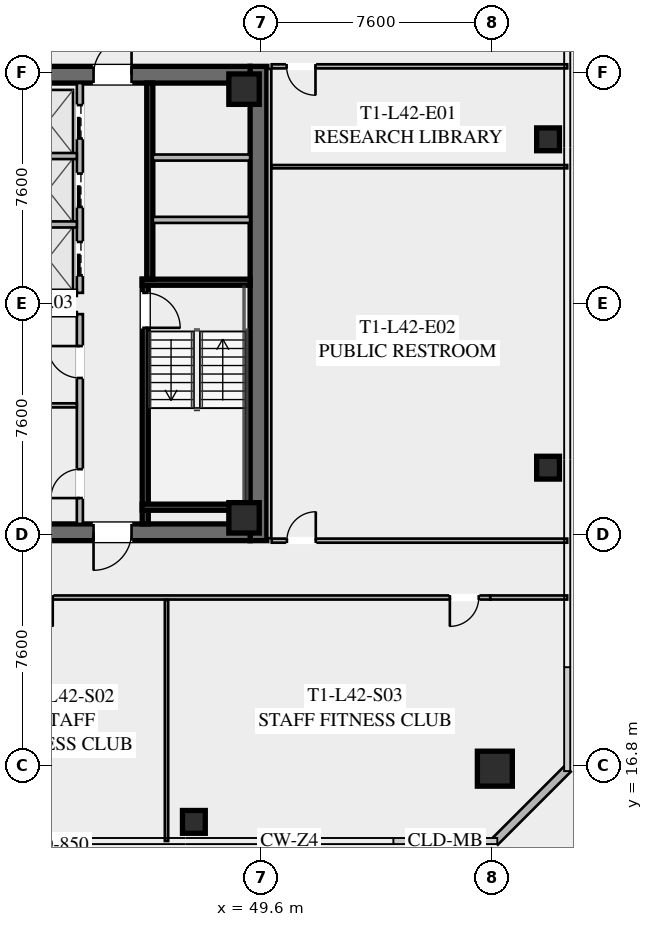
"""IFC4 building model, lengths in metres.
Left out: names, types, materials, properties, quantities, classifications, styles, units other than length and angle.
Written with IfcOpenShell. Run it as: python <this file> out.ifc"""

import sys

from ifc_helpers import new_model, si_unit, direction, frame, frame_2d, origin, origin_2d, place, context, subcontext, project, spatial, rectangle, hollow_rectangle, extrude, element, fill, save


model = new_model("IFC4")
c1 = context("Model", 3, precision=1e-05, world=origin(), true_north=direction((0.0, 1.0)))
c2 = subcontext(c1, "Body", "Model", "MODEL_VIEW")
j1 = project(units=[si_unit("LENGTHUNIT", "METRE"), si_unit("PLANEANGLEUNIT", "RADIAN")], contexts=[c1])
p1 = place(None, origin())
s1 = spatial("IfcSite", under=j1, at=p1, CompositionType="ELEMENT")
p2 = place(p1, origin())
s2 = spatial("IfcBuilding", under=s1, at=p2, CompositionType="ELEMENT")
p3 = place(p2, frame((0.0, 0.0, 157.0)))
s3 = spatial("IfcBuildingStorey", under=s2, at=p3, CompositionType="ELEMENT", Elevation=157.0)
p4 = place(p3, frame((49.525, 39.8, 0.0), z_axis=(0.0, 0.0, 1.0), x_axis=(0.0, -1.0, 0.0)))
e1 = element("IfcWall", 1, at=p4, inside=s3, PredefinedType="SHEAR", context=c2, shape_type="SweptSolid", body=[
    extrude(rectangle(XDim=15.6, YDim=0.55, at=frame_2d((7.8, 0.0))), origin(), (0.0, 0.0, 1.0), 3.55),
])
p5 = place(p3, frame((49.25, 24.475, 0.0), z_axis=(0.0, 0.0, 1.0), x_axis=(-1.0, 0.0, 0.0)))
e2 = element("IfcWall", 2, at=p5, inside=s3, PredefinedType="SHEAR", context=c2, shape_type="SweptSolid", body=[
    extrude(rectangle(XDim=14.5, YDim=0.55, at=frame_2d((7.25, 0.0))), origin(), (0.0, 0.0, 1.0), 3.55),
])
p6 = place(p5, frame((8.95, 0.0, 0.0)))
e3 = element("IfcOpeningElement", 3, at=p6, cuts=e2, PredefinedType="OPENING", context=c2, shape_type="SweptSolid", body=[
    extrude(rectangle(XDim=1.25, YDim=2.25, at=frame_2d((0.625, 1.125))), frame((0.0, 0.285, 0.0), z_axis=(0.0, -1.0, 0.0), x_axis=(1.0, 0.0, 0.0)), (0.0, 0.0, 1.0), 0.57),
])
p7 = place(p5, frame((3.9, 0.0, 0.0)))
e4 = element("IfcOpeningElement", 4, at=p7, cuts=e2, PredefinedType="OPENING", context=c2, shape_type="SweptSolid", body=[
    extrude(rectangle(XDim=1.25, YDim=2.25, at=frame_2d((0.625, 1.125))), frame((0.0, 0.285, 0.0), z_axis=(0.0, -1.0, 0.0), x_axis=(1.0, 0.0, 0.0)), (0.0, 0.0, 1.0), 0.57),
])
p8 = place(p3, frame((34.75, 39.525, 0.0), z_axis=(0.0, 0.0, 1.0), x_axis=(1.0, 0.0, 0.0)))
e5 = element("IfcWall", 5, at=p8, inside=s3, PredefinedType="SHEAR", context=c2, shape_type="SweptSolid", body=[
    extrude(rectangle(XDim=14.5, YDim=0.55, at=frame_2d((7.25, 0.0))), origin(), (0.0, 0.0, 1.0), 3.55),
])
p9 = place(p8, frame((4.3, 0.0, 0.0)))
e6 = element("IfcOpeningElement", 6, at=p9, cuts=e5, PredefinedType="OPENING", context=c2, shape_type="SweptSolid", body=[
    extrude(rectangle(XDim=1.25, YDim=2.25, at=frame_2d((0.625, 1.125))), frame((0.0, 0.285, 0.0), z_axis=(0.0, -1.0, 0.0), x_axis=(1.0, 0.0, 0.0)), (0.0, 0.0, 1.0), 0.57),
])
p10 = place(p8, frame((9.35, 0.0, 0.0)))
e7 = element("IfcOpeningElement", 7, at=p10, cuts=e5, PredefinedType="OPENING", context=c2, shape_type="SweptSolid", body=[
    extrude(rectangle(XDim=1.25, YDim=2.25, at=frame_2d((0.625, 1.125))), frame((0.0, 0.285, 0.0), z_axis=(0.0, -1.0, 0.0), x_axis=(1.0, 0.0, 0.0)), (0.0, 0.0, 1.0), 0.57),
])
for number, where, z_axis, x_axis in (
    (8, (49.05, 24.95, 0.0), (0.0, 0.0, 1.0), (1.0, 0.0, 0.0)),
    (9, (49.05, 39.05, 0.0), (0.0, 0.0, 1.0), (1.0, 0.0, 0.0)),
):
    element("IfcColumn", number, at=place(p3, frame(where, z_axis=z_axis, x_axis=x_axis)), inside=s3, PredefinedType="COLUMN", context=c2, shape_type="SweptSolid", body=[
        extrude(hollow_rectangle(XDim=1.0, YDim=1.0, WallThickness=0.04, at=origin_2d()), origin(), (0.0, 0.0, 1.0), 3.37),
    ])
p11 = place(p3, frame((57.3, 16.7, -0.175), z_axis=(0.0, 0.0, 1.0), x_axis=(1.0, 0.0, 0.0)))
e10 = element("IfcColumn", 10, at=p11, inside=s3, PredefinedType="COLUMN", context=c2, shape_type="SweptSolid", body=[
    extrude(hollow_rectangle(XDim=1.15, YDim=1.15, WallThickness=0.045, at=origin_2d()), origin(), (0.0, 0.0, 1.0), 3.545),
])
for number, where, z_axis, x_axis in (
    (11, (47.4, 14.95, -0.175), (0.0, 0.0, 1.0), (1.0, 0.0, 0.0)),
    (12, (59.05, 26.6, -0.175), (0.0, 0.0, 1.0), (1.0, 0.0, 0.0)),
    (13, (59.05, 37.4, -0.175), (0.0, 0.0, 1.0), (1.0, 0.0, 0.0)),
):
    element("IfcColumn", number, at=place(p3, frame(where, z_axis=z_axis, x_axis=x_axis)), inside=s3, PredefinedType="COLUMN", context=c2, shape_type="SweptSolid", body=[
        extrude(hollow_rectangle(XDim=0.75, YDim=0.75, WallThickness=0.032, at=origin_2d()), origin(), (0.0, 0.0, 1.0), 3.545),
    ])
p12 = place(p3, frame((59.7, 16.7, 0.0), z_axis=(0.0, 0.0, 1.0), x_axis=(-0.707106781187, -0.707106781187, 0.0)))
e14 = element("IfcWall", 14, at=p12, inside=s3, PredefinedType="SOLIDWALL", context=c2, shape_type="SweptSolid", body=[
    extrude(rectangle(XDim=3.394, YDim=0.28, at=frame_2d((1.697, 0.0))), origin(), (0.0, 0.0, 1.0), 3.37),
])
p13 = place(p3, frame((45.8, 32.8, 0.0), z_axis=(0.0, 0.0, 1.0), x_axis=(0.0, -1.0, 0.0)))
e15 = element("IfcWall", 15, at=p13, inside=s3, PredefinedType="SHEAR", context=c2, shape_type="SweptSolid", body=[
    extrude(rectangle(XDim=8.05, YDim=0.2, at=frame_2d((4.025, 0.0))), origin(), (0.0, 0.0, 1.0), 3.37),
])
p14 = place(p13, frame((0.45, 0.0, 0.0)))
e16 = element("IfcOpeningElement", 16, at=p14, cuts=e15, PredefinedType="OPENING", context=c2, shape_type="SweptSolid", body=[
    extrude(rectangle(XDim=1.15, YDim=2.2, at=frame_2d((0.575, 1.1))), frame((0.0, 0.11, 0.0), z_axis=(0.0, -1.0, 0.0), x_axis=(1.0, 0.0, 0.0)), (0.0, 0.0, 1.0), 0.22),
])
for number, where, z_axis, x_axis in (
    (17, (45.7, 32.7, 0.0), (0.0, 0.0, 1.0), (1.0, 0.0, 0.0)),
    (18, (45.7, 25.3, 0.0), (0.0, 0.0, 1.0), (1.0, 0.0, 0.0)),
):
    element("IfcWall", number, at=place(p3, frame(where, z_axis=z_axis, x_axis=x_axis)), inside=s3, PredefinedType="SHEAR", context=c2, shape_type="SweptSolid", body=[
        extrude(rectangle(XDim=3.55, YDim=0.2, at=frame_2d((1.775, 0.0))), origin(), (0.0, 0.0, 1.0), 3.37),
    ])
p15 = place(p3, frame((45.95, 39.25, 0.0), z_axis=(0.0, 0.0, 1.0), x_axis=(0.0, -1.0, 0.0)))
e19 = element("IfcWall", 19, at=p15, inside=s3, PredefinedType="SHEAR", context=c2, shape_type="SweptSolid", body=[
    extrude(rectangle(XDim=6.45, YDim=0.2, at=frame_2d((3.225, 0.0))), origin(), (0.0, 0.0, 1.0), 3.37),
])
for number, where, z_axis, x_axis in (
    (20, (46.05, 34.75, 0.0), (0.0, 0.0, 1.0), (1.0, 0.0, 0.0)),
    (21, (46.05, 36.8, 0.0), (0.0, 0.0, 1.0), (1.0, 0.0, 0.0)),
):
    element("IfcWall", number, at=place(p3, frame(where, z_axis=z_axis, x_axis=x_axis)), inside=s3, PredefinedType="SOLIDWALL", context=c2, shape_type="SweptSolid", body=[
        extrude(rectangle(XDim=3.2, YDim=0.2, at=frame_2d((1.6, 0.0))), origin(), (0.0, 0.0, 1.0), 3.37),
    ])
p16 = place(p3, frame((43.65, 24.75, 0.0), z_axis=(0.0, 0.0, 1.0), x_axis=(0.0, 1.0, 0.0)))
e22 = element("IfcWall", 22, at=p16, inside=s3, PredefinedType="SOLIDWALL", context=c2, shape_type="SweptSolid", body=[
    extrude(rectangle(XDim=6.9, YDim=0.2, at=frame_2d((3.45, 0.0))), origin(), (0.0, 0.0, 1.0), 2.723),
])
p17 = place(p16, frame((0.85, 0.0, 0.0)))
e23 = element("IfcOpeningElement", 23, at=p17, cuts=e22, PredefinedType="OPENING", context=c2, shape_type="SweptSolid", body=[
    extrude(rectangle(XDim=0.95, YDim=2.05, at=frame_2d((0.475, 1.025))), frame((0.0, 0.11, 0.0), z_axis=(0.0, -1.0, 0.0), x_axis=(1.0, 0.0, 0.0)), (0.0, 0.0, 1.0), 0.22),
])
p18 = place(p16, frame((4.8, 0.0, 0.0)))
e24 = element("IfcOpeningElement", 24, at=p18, cuts=e22, PredefinedType="OPENING", context=c2, shape_type="SweptSolid", body=[
    extrude(rectangle(XDim=1.05, YDim=2.2, at=frame_2d((0.525, 1.1))), frame((0.0, 0.11, 0.0), z_axis=(0.0, -1.0, 0.0), x_axis=(1.0, 0.0, 0.0)), (0.0, 0.0, 1.0), 0.22),
])
for number, where, z_axis, x_axis in (
    (25, (41.67, 31.65, 0.0), (0.0, 0.0, 1.0), (1.0, 0.0, 0.0)),
    (26, (41.67, 28.65, 0.0), (0.0, 0.0, 1.0), (1.0, 0.0, 0.0)),
):
    element("IfcWall", number, at=place(p3, frame(where, z_axis=z_axis, x_axis=x_axis)), inside=s3, PredefinedType="PARTITIONING", context=c2, shape_type="SweptSolid", body=[
        extrude(rectangle(XDim=1.88, YDim=0.135, at=frame_2d((0.94, 0.0))), origin(), (0.0, 0.0, 1.0), 2.723),
    ])
p19 = place(p3, frame((43.65, 32.35, 0.0), z_axis=(0.0, 0.0, 1.0), x_axis=(0.0, 1.0, 0.0)))
e27 = element("IfcWall", 27, at=p19, inside=s3, PredefinedType="SOLIDWALL", context=c2, shape_type="SweptSolid", body=[
    extrude(rectangle(XDim=6.9, YDim=0.2, at=frame_2d((3.45, 0.0))), origin(), (0.0, 0.0, 1.0), 3.37),
])
p20 = place(p19, frame((0.575, 0.0, 0.0)))
e28 = element("IfcOpeningElement", 28, at=p20, cuts=e27, PredefinedType="OPENING", context=c2, shape_type="SweptSolid", body=[
    extrude(rectangle(XDim=1.1, YDim=2.2, at=frame_2d((0.55, 1.1))), frame((0.0, 0.11, 0.0), z_axis=(0.0, -1.0, 0.0), x_axis=(1.0, 0.0, 0.0)), (0.0, 0.0, 1.0), 0.22),
])
p21 = place(p19, frame((2.825, 0.0, 0.0)))
e29 = element("IfcOpeningElement", 29, at=p21, cuts=e27, PredefinedType="OPENING", context=c2, shape_type="SweptSolid", body=[
    extrude(rectangle(XDim=1.1, YDim=2.2, at=frame_2d((0.55, 1.1))), frame((0.0, 0.11, 0.0), z_axis=(0.0, -1.0, 0.0), x_axis=(1.0, 0.0, 0.0)), (0.0, 0.0, 1.0), 0.22),
])
p22 = place(p19, frame((5.075, 0.0, 0.0)))
e30 = element("IfcOpeningElement", 30, at=p22, cuts=e27, PredefinedType="OPENING", context=c2, shape_type="SweptSolid", body=[
    extrude(rectangle(XDim=1.1, YDim=2.2, at=frame_2d((0.55, 1.1))), frame((0.0, 0.11, 0.0), z_axis=(0.0, -1.0, 0.0), x_axis=(1.0, 0.0, 0.0)), (0.0, 0.0, 1.0), 0.22),
])
for number, where, z_axis, x_axis in (
    (31, (41.67, 32.35, 0.0), (0.0, 0.0, 1.0), (1.0, 0.0, 0.0)),
    (32, (41.67, 34.6, 0.0), (0.0, 0.0, 1.0), (1.0, 0.0, 0.0)),
    (33, (41.67, 36.85, 0.0), (0.0, 0.0, 1.0), (1.0, 0.0, 0.0)),
):
    element("IfcWall", number, at=place(p3, frame(where, z_axis=z_axis, x_axis=x_axis)), inside=s3, PredefinedType="SOLIDWALL", context=c2, shape_type="SweptSolid", body=[
        extrude(rectangle(XDim=1.88, YDim=0.2, at=frame_2d((0.94, 0.0))), origin(), (0.0, 0.0, 1.0), 3.37),
    ])
p23 = place(p3, frame((57.15, 22.33, 0.0), z_axis=(0.0, 0.0, 1.0), x_axis=(-1.0, 0.0, 0.0)))
e34 = element("IfcWall", 34, at=p23, inside=s3, PredefinedType="PARTITIONING", context=c2, shape_type="SweptSolid", body=[
    extrude(rectangle(XDim=30.3, YDim=0.135, at=frame_2d((15.15, 0.0))), origin(), (0.0, 0.0, 1.0), 2.723),
])
p24 = place(p23, frame((28.97, 0.0, 0.0)))
e35 = element("IfcOpeningElement", 35, at=p24, cuts=e34, PredefinedType="OPENING", context=c2, shape_type="SweptSolid", body=[
    extrude(rectangle(XDim=0.95, YDim=2.05, at=frame_2d((0.475, 1.025))), frame((0.0, 0.077, 0.0), z_axis=(0.0, -1.0, 0.0), x_axis=(1.0, 0.0, 0.0)), (0.0, 0.0, 1.0), 0.155),
])
p25 = place(p23, frame((14.392, 0.0, 0.0)))
e36 = element("IfcOpeningElement", 36, at=p25, cuts=e34, PredefinedType="OPENING", context=c2, shape_type="SweptSolid", body=[
    extrude(rectangle(XDim=0.95, YDim=2.05, at=frame_2d((0.475, 1.025))), frame((0.0, 0.077, 0.0), z_axis=(0.0, -1.0, 0.0), x_axis=(1.0, 0.0, 0.0)), (0.0, 0.0, 1.0), 0.155),
])
p26 = place(p23, frame((0.38, 0.0, 0.0)))
e37 = element("IfcOpeningElement", 37, at=p26, cuts=e34, PredefinedType="OPENING", context=c2, shape_type="SweptSolid", body=[
    extrude(rectangle(XDim=0.95, YDim=2.05, at=frame_2d((0.475, 1.025))), frame((0.0, 0.077, 0.0), z_axis=(0.0, -1.0, 0.0), x_axis=(1.0, 0.0, 0.0)), (0.0, 0.0, 1.0), 0.155),
])
p27 = place(p3, frame((57.15, 22.33, 0.0), z_axis=(0.0, 0.0, 1.0), x_axis=(1.0, 0.0, 0.0)))
e38 = element("IfcWall", 38, at=p27, inside=s3, PredefinedType="PARTITIONING", context=c2, shape_type="SweptSolid", body=[
    extrude(rectangle(XDim=2.53, YDim=0.135, at=frame_2d((1.265, 0.0))), origin(), (0.0, 0.0, 1.0), 2.723),
])
p28 = place(p3, frame((46.5, 14.32, 0.0), z_axis=(0.0, 0.0, 1.0), x_axis=(0.0, 1.0, 0.0)))
e39 = element("IfcWall", 39, at=p28, inside=s3, PredefinedType="PARTITIONING", context=c2, shape_type="SweptSolid", body=[
    extrude(rectangle(XDim=7.93, YDim=0.11, at=frame_2d((3.965, 0.0))), origin(), (0.0, 0.0, 1.0), 2.723),
])
p29 = place(p3, frame((49.88, 39.72, 0.0), z_axis=(0.0, 0.0, 1.0), x_axis=(0.0, -1.0, 0.0)))
e40 = element("IfcWall", 40, at=p29, inside=s3, PredefinedType="PARTITIONING", context=c2, shape_type="SweptSolid", body=[
    extrude(rectangle(XDim=15.44, YDim=0.135, at=frame_2d((7.72, 0.0))), origin(), (0.0, 0.0, 1.0), 2.723),
])
p30 = place(p3, frame((59.68, 39.8, 0.0), z_axis=(0.0, 0.0, 1.0), x_axis=(-1.0, 0.0, 0.0)))
e41 = element("IfcWall", 41, at=p30, inside=s3, PredefinedType="PARTITIONING", context=c2, shape_type="SweptSolid", body=[
    extrude(rectangle(XDim=9.72, YDim=0.135, at=frame_2d((4.86, 0.0))), origin(), (0.0, 0.0, 1.0), 2.723),
])
p31 = place(p30, frame((8.28, 0.0, 0.0)))
e42 = element("IfcOpeningElement", 42, at=p31, cuts=e41, PredefinedType="OPENING", context=c2, shape_type="SweptSolid", body=[
    extrude(rectangle(XDim=0.95, YDim=2.05, at=frame_2d((0.475, 1.025))), frame((0.0, 0.077, 0.0), z_axis=(0.0, -1.0, 0.0), x_axis=(1.0, 0.0, 0.0)), (0.0, 0.0, 1.0), 0.155),
])
p32 = place(p3, frame((49.96, 24.2, 0.0), z_axis=(0.0, 0.0, 1.0), x_axis=(1.0, 0.0, 0.0)))
e43 = element("IfcWall", 43, at=p32, inside=s3, PredefinedType="PARTITIONING", context=c2, shape_type="SweptSolid", body=[
    extrude(rectangle(XDim=9.72, YDim=0.135, at=frame_2d((4.86, 0.0))), origin(), (0.0, 0.0, 1.0), 2.723),
])
p33 = place(p32, frame((0.5, 0.0, 0.0)))
e44 = element("IfcOpeningElement", 44, at=p33, cuts=e43, PredefinedType="OPENING", context=c2, shape_type="SweptSolid", body=[
    extrude(rectangle(XDim=0.95, YDim=2.05, at=frame_2d((0.475, 1.025))), frame((0.0, 0.077, 0.0), z_axis=(0.0, -1.0, 0.0), x_axis=(1.0, 0.0, 0.0)), (0.0, 0.0, 1.0), 0.155),
])
p34 = place(p3, frame((49.96, 36.5, 0.0), z_axis=(0.0, 0.0, 1.0), x_axis=(1.0, 0.0, 0.0)))
e45 = element("IfcWall", 45, at=p34, inside=s3, PredefinedType="PARTITIONING", context=c2, shape_type="SweptSolid", body=[
    extrude(rectangle(XDim=9.72, YDim=0.11, at=frame_2d((4.86, 0.0))), origin(), (0.0, 0.0, 1.0), 2.723),
])
p35 = place(p10, origin())
e46 = element("IfcDoor", 46, at=p35, inside=s3, OperationType="SINGLE_SWING_RIGHT", PredefinedType="DOOR", context=c2, shape_type="SweptSolid", body=[
    extrude(rectangle(XDim=1.25, YDim=2.25, at=frame_2d((0.625, 1.125))), frame((0.0, 0.025, 0.0), z_axis=(0.0, -1.0, 0.0), x_axis=(1.0, 0.0, 0.0)), (0.0, 0.0, 1.0), 0.05),
])
fill(e7, e46)
p36 = place(p7, origin())
e47 = element("IfcDoor", 47, at=p36, inside=s3, OperationType="SINGLE_SWING_RIGHT", PredefinedType="DOOR", context=c2, shape_type="SweptSolid", body=[
    extrude(rectangle(XDim=1.25, YDim=2.25, at=frame_2d((0.625, 1.125))), frame((0.0, 0.025, 0.0), z_axis=(0.0, -1.0, 0.0), x_axis=(1.0, 0.0, 0.0)), (0.0, 0.0, 1.0), 0.05),
])
fill(e4, e47)
p37 = place(p14, origin())
e48 = element("IfcDoor", 48, at=p37, inside=s3, OperationType="SINGLE_SWING_RIGHT", PredefinedType="DOOR", context=c2, shape_type="SweptSolid", body=[
    extrude(rectangle(XDim=1.15, YDim=2.2, at=frame_2d((0.575, 1.1))), frame((0.0, 0.025, 0.0), z_axis=(0.0, -1.0, 0.0), x_axis=(1.0, 0.0, 0.0)), (0.0, 0.0, 1.0), 0.05),
])
fill(e16, e48)
p38 = place(p17, origin())
e49 = element("IfcDoor", 49, at=p38, inside=s3, OperationType="SINGLE_SWING_LEFT", PredefinedType="DOOR", context=c2, shape_type="SweptSolid", body=[
    extrude(rectangle(XDim=0.95, YDim=2.05, at=frame_2d((0.475, 1.025))), frame((0.0, 0.025, 0.0), z_axis=(0.0, -1.0, 0.0), x_axis=(1.0, 0.0, 0.0)), (0.0, 0.0, 1.0), 0.05),
])
fill(e23, e49)
p39 = place(p18, origin())
e50 = element("IfcDoor", 50, at=p39, inside=s3, OperationType="SINGLE_SWING_RIGHT", PredefinedType="DOOR", context=c2, shape_type="SweptSolid", body=[
    extrude(rectangle(XDim=1.05, YDim=2.2, at=frame_2d((0.525, 1.1))), frame((0.0, 0.025, 0.0), z_axis=(0.0, -1.0, 0.0), x_axis=(1.0, 0.0, 0.0)), (0.0, 0.0, 1.0), 0.05),
])
fill(e24, e50)
p40 = place(p25, origin())
e51 = element("IfcDoor", 51, at=p40, inside=s3, OperationType="SINGLE_SWING_LEFT", PredefinedType="DOOR", context=c2, shape_type="SweptSolid", body=[
    extrude(rectangle(XDim=0.95, YDim=2.05, at=frame_2d((0.475, 1.025))), frame((0.0, 0.025, 0.0), z_axis=(0.0, -1.0, 0.0), x_axis=(1.0, 0.0, 0.0)), (0.0, 0.0, 1.0), 0.05),
])
fill(e36, e51)
p41 = place(p26, origin())
e52 = element("IfcDoor", 52, at=p41, inside=s3, OperationType="SINGLE_SWING_RIGHT", PredefinedType="DOOR", context=c2, shape_type="SweptSolid", body=[
    extrude(rectangle(XDim=0.95, YDim=2.05, at=frame_2d((0.475, 1.025))), frame((0.0, 0.025, 0.0), z_axis=(0.0, -1.0, 0.0), x_axis=(1.0, 0.0, 0.0)), (0.0, 0.0, 1.0), 0.05),
])
fill(e37, e52)
p42 = place(p31, origin())
e53 = element("IfcDoor", 53, at=p42, inside=s3, OperationType="SINGLE_SWING_LEFT", PredefinedType="DOOR", context=c2, shape_type="SweptSolid", body=[
    extrude(rectangle(XDim=0.95, YDim=2.05, at=frame_2d((0.475, 1.025))), frame((0.0, 0.025, 0.0), z_axis=(0.0, -1.0, 0.0), x_axis=(1.0, 0.0, 0.0)), (0.0, 0.0, 1.0), 0.05),
])
fill(e42, e53)
p43 = place(p33, origin())
e54 = element("IfcDoor", 54, at=p43, inside=s3, OperationType="SINGLE_SWING_RIGHT", PredefinedType="DOOR", context=c2, shape_type="SweptSolid", body=[
    extrude(rectangle(XDim=0.95, YDim=2.05, at=frame_2d((0.475, 1.025))), frame((0.0, 0.025, 0.0), z_axis=(0.0, -1.0, 0.0), x_axis=(1.0, 0.0, 0.0)), (0.0, 0.0, 1.0), 0.05),
])
fill(e44, e54)
p44 = place(p20, origin())
e55 = element("IfcDoor", 55, at=p44, inside=s3, OperationType="SLIDING_TO_LEFT", PredefinedType="DOOR", context=c2, shape_type="SweptSolid", body=[
    extrude(rectangle(XDim=1.1, YDim=2.2, at=frame_2d((0.55, 1.1))), frame((0.0, 0.025, 0.0), z_axis=(0.0, -1.0, 0.0), x_axis=(1.0, 0.0, 0.0)), (0.0, 0.0, 1.0), 0.05),
])
fill(e28, e55)
p45 = place(p21, origin())
e56 = element("IfcDoor", 56, at=p45, inside=s3, OperationType="SLIDING_TO_LEFT", PredefinedType="DOOR", context=c2, shape_type="SweptSolid", body=[
    extrude(rectangle(XDim=1.1, YDim=2.2, at=frame_2d((0.55, 1.1))), frame((0.0, 0.025, 0.0), z_axis=(0.0, -1.0, 0.0), x_axis=(1.0, 0.0, 0.0)), (0.0, 0.0, 1.0), 0.05),
])
fill(e29, e56)
p46 = place(p22, origin())
e57 = element("IfcDoor", 57, at=p46, inside=s3, OperationType="SLIDING_TO_LEFT", PredefinedType="DOOR", context=c2, shape_type="SweptSolid", body=[
    extrude(rectangle(XDim=1.1, YDim=2.2, at=frame_2d((0.55, 1.1))), frame((0.0, 0.025, 0.0), z_axis=(0.0, -1.0, 0.0), x_axis=(1.0, 0.0, 0.0)), (0.0, 0.0, 1.0), 0.05),
])
fill(e30, e57)
save(model, sys.argv[1])
